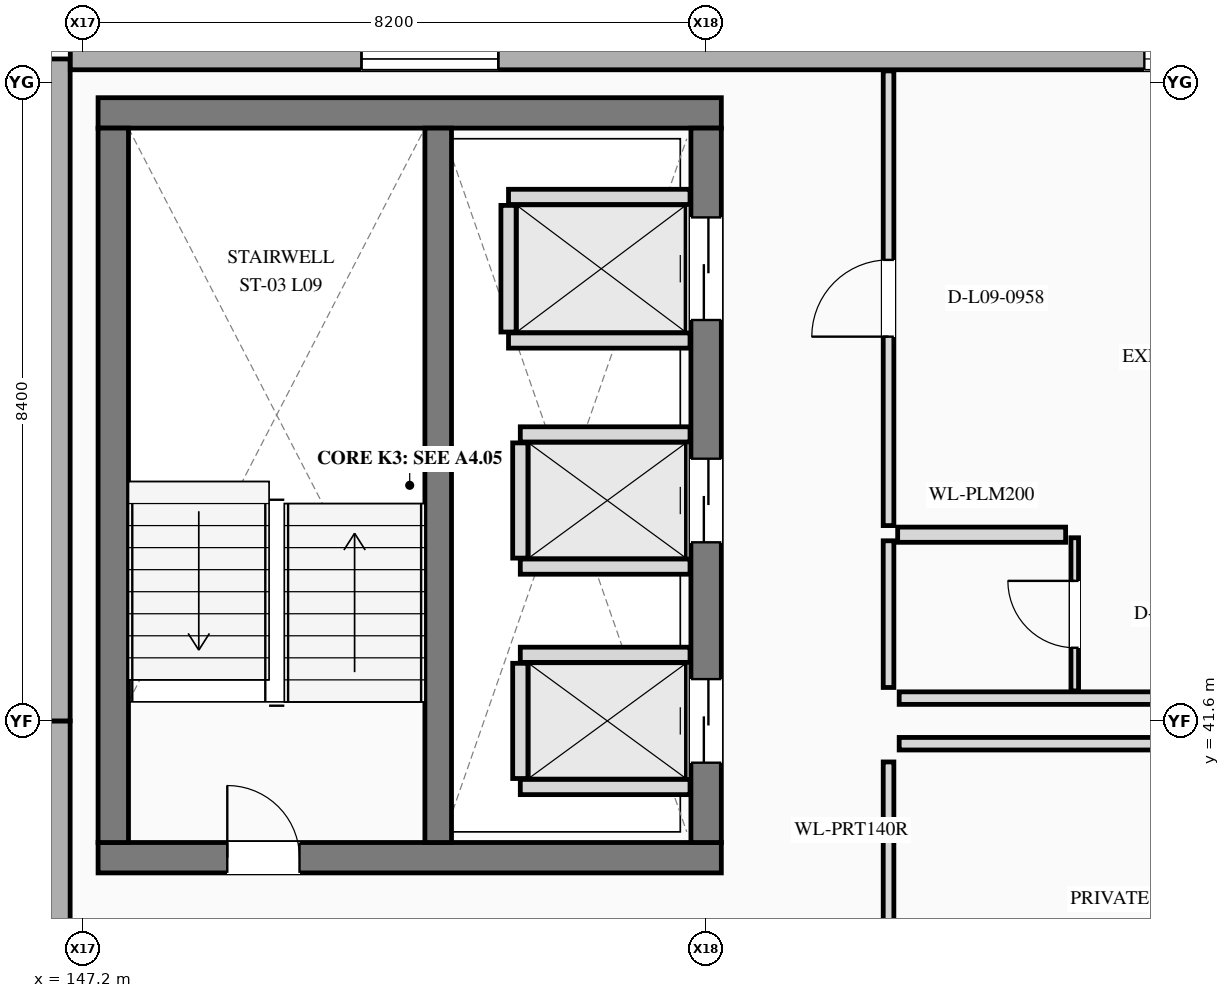
"""IFC4 building model, lengths in metres.
Left out: names, types, materials, properties, quantities, classifications, styles, units other than length and angle.
Written with IfcOpenShell. Run it as: python <this file> out.ifc"""

import sys

from ifc_helpers import new_model, si_unit, direction, frame, frame_2d, origin, place, context, subcontext, project, spatial, rectangle, extrude, element, fill, save


model = new_model("IFC4")
c1 = context("Model", 3, precision=1e-05, world=origin(), true_north=direction((0.0, 1.0)))
c2 = subcontext(c1, "Body", "Model", "MODEL_VIEW")
j1 = project(units=[si_unit("LENGTHUNIT", "METRE"), si_unit("PLANEANGLEUNIT", "RADIAN")], contexts=[c1])
p1 = place(None, origin())
s1 = spatial("IfcSite", under=j1, at=p1, CompositionType="ELEMENT")
p2 = place(p1, origin())
s2 = spatial("IfcBuilding", under=s1, at=p2, CompositionType="ELEMENT")
p3 = place(p2, frame((0.0, 0.0, 37.6)))
s3 = spatial("IfcBuildingStorey", under=s2, at=p3, CompositionType="ELEMENT", Elevation=37.6)
p4 = place(p3, frame((146.89, 33.2, 0.0), z_axis=(0.0, 0.0, 1.0), x_axis=(0.0, 1.0, 0.0)))
e1 = element("IfcWall", 1, at=p4, inside=s3, PredefinedType="STANDARD", context=c2, shape_type="SweptSolid", body=[
    extrude(rectangle(XDim=8.4, YDim=0.285, at=frame_2d((4.2, 0.0))), origin(), (0.0, 0.0, 1.0), 3.5),
])
p5 = place(p3, frame((146.89, 41.6, 0.0), z_axis=(0.0, 0.0, 1.0), x_axis=(0.0, 1.0, 0.0)))
e2 = element("IfcWall", 2, at=p5, inside=s3, PredefinedType="STANDARD", context=c2, shape_type="SweptSolid", body=[
    extrude(rectangle(XDim=8.71, YDim=0.285, at=frame_2d((4.355, 0.0))), origin(), (0.0, 0.0, 1.0), 3.5),
])
p6 = place(p3, frame((166.166, 50.31, 0.0), z_axis=(0.0, 0.0, 1.0), x_axis=(-1.0, 0.0, 0.0)))
e3 = element("IfcWall", 3, at=p6, inside=s3, PredefinedType="STANDARD", context=c2, shape_type="SweptSolid", body=[
    extrude(rectangle(XDim=19.131, YDim=0.285, at=frame_2d((9.565, 0.0))), origin(), (0.0, 0.0, 1.0), 3.5),
])
p7 = place(p6, frame((3.2, 0.0, 0.88)))
e4 = element("IfcOpeningElement", 4, at=p7, cuts=e3, PredefinedType="OPENING", context=c2, shape_type="SweptSolid", body=[
    extrude(rectangle(XDim=1.8, YDim=1.8, at=frame_2d((0.9, 0.9))), frame((0.0, 0.152, 0.0), z_axis=(0.0, -1.0, 0.0), x_axis=(1.0, 0.0, 0.0)), (0.0, 0.0, 1.0), 0.305),
])
p8 = place(p6, frame((13.5, 0.0, 0.88)))
e5 = element("IfcOpeningElement", 5, at=p8, cuts=e3, PredefinedType="OPENING", context=c2, shape_type="SweptSolid", body=[
    extrude(rectangle(XDim=1.8, YDim=1.8, at=frame_2d((0.9, 0.9))), frame((0.0, 0.152, 0.0), z_axis=(0.0, -1.0, 0.0), x_axis=(1.0, 0.0, 0.0)), (0.0, 0.0, 1.0), 0.305),
])
p9 = place(p3, frame((147.4, 39.8, 0.0), z_axis=(0.0, 0.0, 1.0), x_axis=(1.0, 0.0, 0.0)))
e6 = element("IfcWall", 6, at=p9, inside=s3, PredefinedType="SHEAR", context=c2, shape_type="SweptSolid", body=[
    extrude(rectangle(XDim=8.2, YDim=0.4, at=frame_2d((4.1, 0.0))), origin(), (0.0, 0.0, 1.0), 3.5),
])
p10 = place(p9, frame((1.7, 0.0, 0.0)))
e7 = element("IfcOpeningElement", 7, at=p10, cuts=e6, PredefinedType="OPENING", context=c2, shape_type="SweptSolid", body=[
    extrude(rectangle(XDim=0.95, YDim=2.2, at=frame_2d((0.475, 1.1))), frame((0.0, 0.21, 0.0), z_axis=(0.0, -1.0, 0.0), x_axis=(1.0, 0.0, 0.0)), (0.0, 0.0, 1.0), 0.42),
])
p11 = place(p3, frame((155.6, 49.6, 0.0), z_axis=(0.0, 0.0, 1.0), x_axis=(-1.0, 0.0, 0.0)))
e8 = element("IfcWall", 8, at=p11, inside=s3, PredefinedType="SHEAR", context=c2, shape_type="SweptSolid", body=[
    extrude(rectangle(XDim=8.2, YDim=0.4, at=frame_2d((4.1, 0.0))), origin(), (0.0, 0.0, 1.0), 3.5),
])
p12 = place(p3, frame((147.6, 49.4, 0.0), z_axis=(0.0, 0.0, 1.0), x_axis=(0.0, -1.0, 0.0)))
e9 = element("IfcWall", 9, at=p12, inside=s3, PredefinedType="SHEAR", context=c2, shape_type="SweptSolid", body=[
    extrude(rectangle(XDim=9.4, YDim=0.4, at=frame_2d((4.7, 0.0))), origin(), (0.0, 0.0, 1.0), 3.5),
])
p13 = place(p3, frame((155.4, 40.0, 0.0), z_axis=(0.0, 0.0, 1.0), x_axis=(0.0, 1.0, 0.0)))
e10 = element("IfcWall", 10, at=p13, inside=s3, PredefinedType="SHEAR", context=c2, shape_type="SweptSolid", body=[
    extrude(rectangle(XDim=9.4, YDim=0.4, at=frame_2d((4.7, 0.0))), origin(), (0.0, 0.0, 1.0), 3.5),
])
p14 = place(p13, frame((1.05, 0.0, 0.0)))
e11 = element("IfcOpeningElement", 11, at=p14, cuts=e10, PredefinedType="OPENING", context=c2, shape_type="SweptSolid", body=[
    extrude(rectangle(XDim=1.1, YDim=2.2, at=frame_2d((0.55, 1.1))), frame((0.0, 0.21, 0.0), z_axis=(0.0, -1.0, 0.0), x_axis=(1.0, 0.0, 0.0)), (0.0, 0.0, 1.0), 0.42),
])
p15 = place(p13, frame((3.95, 0.0, 0.0)))
e12 = element("IfcOpeningElement", 12, at=p15, cuts=e10, PredefinedType="OPENING", context=c2, shape_type="SweptSolid", body=[
    extrude(rectangle(XDim=1.1, YDim=2.2, at=frame_2d((0.55, 1.1))), frame((0.0, 0.21, 0.0), z_axis=(0.0, -1.0, 0.0), x_axis=(1.0, 0.0, 0.0)), (0.0, 0.0, 1.0), 0.42),
])
p16 = place(p13, frame((6.875, 0.0, 0.0)))
e13 = element("IfcOpeningElement", 13, at=p16, cuts=e10, PredefinedType="OPENING", context=c2, shape_type="SweptSolid", body=[
    extrude(rectangle(XDim=1.35, YDim=2.3, at=frame_2d((0.675, 1.15))), frame((0.0, 0.21, 0.0), z_axis=(0.0, -1.0, 0.0), x_axis=(1.0, 0.0, 0.0)), (0.0, 0.0, 1.0), 0.42),
])
p17 = place(p3, frame((151.875, 40.0, 0.0), z_axis=(0.0, 0.0, 1.0), x_axis=(0.0, 1.0, 0.0)))
e14 = element("IfcWall", 14, at=p17, inside=s3, PredefinedType="SHEAR", context=c2, shape_type="SweptSolid", body=[
    extrude(rectangle(XDim=9.4, YDim=0.35, at=frame_2d((4.7, 0.0))), origin(), (0.0, 0.0, 1.0), 3.5),
])
for number, where, z_axis, x_axis in (
    (15, (152.955, 40.73, 0.0), (0.0, 0.0, 1.0), (1.0, 0.0, 0.0)),
    (16, (152.955, 42.47, 0.0), (0.0, 0.0, 1.0), (1.0, 0.0, 0.0)),
):
    element("IfcWall", number, at=place(p3, frame(where, z_axis=z_axis, x_axis=x_axis)), inside=s3, PredefinedType="PLUMBINGWALL", context=c2, shape_type="SweptSolid", body=[
        extrude(rectangle(XDim=2.233, YDim=0.2, at=frame_2d((1.116, 0.0))), origin(), (0.0, 0.0, 1.0), 3.2),
    ])
p18 = place(p3, frame((152.955, 40.842, 0.0), z_axis=(0.0, 0.0, 1.0), x_axis=(0.0, 1.0, 0.0)))
e17 = element("IfcWall", 17, at=p18, inside=s3, PredefinedType="PLUMBINGWALL", context=c2, shape_type="SweptSolid", body=[
    extrude(rectangle(XDim=1.516, YDim=0.2, at=frame_2d((0.758, 0.0))), origin(), (0.0, 0.0, 1.0), 3.2),
])
for number, where, z_axis, x_axis in (
    (18, (152.955, 43.63, 0.0), (0.0, 0.0, 1.0), (1.0, 0.0, 0.0)),
    (19, (152.955, 45.37, 0.0), (0.0, 0.0, 1.0), (1.0, 0.0, 0.0)),
):
    element("IfcWall", number, at=place(p3, frame(where, z_axis=z_axis, x_axis=x_axis)), inside=s3, PredefinedType="PLUMBINGWALL", context=c2, shape_type="SweptSolid", body=[
        extrude(rectangle(XDim=2.233, YDim=0.2, at=frame_2d((1.116, 0.0))), origin(), (0.0, 0.0, 1.0), 3.2),
    ])
p19 = place(p3, frame((152.955, 43.742, 0.0), z_axis=(0.0, 0.0, 1.0), x_axis=(0.0, 1.0, 0.0)))
e20 = element("IfcWall", 20, at=p19, inside=s3, PredefinedType="PLUMBINGWALL", context=c2, shape_type="SweptSolid", body=[
    extrude(rectangle(XDim=1.516, YDim=0.2, at=frame_2d((0.758, 0.0))), origin(), (0.0, 0.0, 1.0), 3.2),
])
for number, where, z_axis, x_axis in (
    (21, (152.8, 46.605, 0.0), (0.0, 0.0, 1.0), (1.0, 0.0, 0.0)),
    (22, (152.8, 48.495, 0.0), (0.0, 0.0, 1.0), (1.0, 0.0, 0.0)),
):
    element("IfcWall", number, at=place(p3, frame(where, z_axis=z_axis, x_axis=x_axis)), inside=s3, PredefinedType="PLUMBINGWALL", context=c2, shape_type="SweptSolid", body=[
        extrude(rectangle(XDim=2.388, YDim=0.2, at=frame_2d((1.194, 0.0))), origin(), (0.0, 0.0, 1.0), 3.2),
    ])
p20 = place(p3, frame((152.8, 46.717, 0.0), z_axis=(0.0, 0.0, 1.0), x_axis=(0.0, 1.0, 0.0)))
e23 = element("IfcWall", 23, at=p20, inside=s3, PredefinedType="PLUMBINGWALL", context=c2, shape_type="SweptSolid", body=[
    extrude(rectangle(XDim=1.666, YDim=0.2, at=frame_2d((0.833, 0.0))), origin(), (0.0, 0.0, 1.0), 3.2),
])
p21 = place(p3, frame((157.8, 42.04, 0.0), z_axis=(0.0, 0.0, 1.0), x_axis=(0.0, 1.0, 0.0)))
e24 = element("IfcWall", 24, at=p21, inside=s3, PredefinedType="PARTITIONING", context=c2, shape_type="SweptSolid", body=[
    extrude(rectangle(XDim=1.93, YDim=0.14, at=frame_2d((0.965, 0.0))), origin(), (0.0, 0.0, 1.0), 3.2),
])
p22 = place(p3, frame((157.8, 44.17, 0.0), z_axis=(0.0, 0.0, 1.0), x_axis=(0.0, 1.0, 0.0)))
e25 = element("IfcWall", 25, at=p22, inside=s3, PredefinedType="PARTITIONING", context=c2, shape_type="SweptSolid", body=[
    extrude(rectangle(XDim=5.983, YDim=0.14, at=frame_2d((2.991, 0.0))), origin(), (0.0, 0.0, 1.0), 3.2),
])
p23 = place(p22, frame((2.486, 0.0, 0.0)))
e26 = element("IfcOpeningElement", 26, at=p23, cuts=e25, PredefinedType="OPENING", context=c2, shape_type="SweptSolid", body=[
    extrude(rectangle(XDim=1.01, YDim=2.2, at=frame_2d((0.505, 1.1))), frame((0.0, 0.08, 0.0), z_axis=(0.0, -1.0, 0.0), x_axis=(1.0, 0.0, 0.0)), (0.0, 0.0, 1.0), 0.16),
])
p24 = place(p3, frame((157.94, 41.9, 0.0), z_axis=(0.0, 0.0, 1.0), x_axis=(1.0, 0.0, 0.0)))
e27 = element("IfcWall", 27, at=p24, inside=s3, PredefinedType="PARTITIONING", context=c2, shape_type="SweptSolid", body=[
    extrude(rectangle(XDim=8.213, YDim=0.165, at=frame_2d((4.106, 0.0))), origin(), (0.0, 0.0, 1.0), 2.59),
])
p25 = place(p3, frame((157.92, 44.05, 0.0), z_axis=(0.0, 0.0, 1.0), x_axis=(1.0, 0.0, 0.0)))
e28 = element("IfcWall", 28, at=p25, inside=s3, PredefinedType="PLUMBINGWALL", context=c2, shape_type="SweptSolid", body=[
    extrude(rectangle(XDim=2.21, YDim=0.2, at=frame_2d((1.105, 0.0))), origin(), (0.0, 0.0, 1.0), 3.2),
])
p26 = place(p3, frame((160.25, 41.994, 0.0), z_axis=(0.0, 0.0, 1.0), x_axis=(0.0, 1.0, 0.0)))
e29 = element("IfcWall", 29, at=p26, inside=s3, PredefinedType="PARTITIONING", context=c2, shape_type="SweptSolid", body=[
    extrude(rectangle(XDim=2.016, YDim=0.1, at=frame_2d((1.008, 0.0))), origin(), (0.0, 0.0, 1.0), 3.2),
])
p27 = place(p26, frame((0.568, 0.0, 0.0)))
e30 = element("IfcOpeningElement", 30, at=p27, cuts=e29, PredefinedType="OPENING", context=c2, shape_type="SweptSolid", body=[
    extrude(rectangle(XDim=0.88, YDim=2.18, at=frame_2d((0.44, 1.09))), frame((0.0, 0.06, 0.0), z_axis=(0.0, -1.0, 0.0), x_axis=(1.0, 0.0, 0.0)), (0.0, 0.0, 1.0), 0.12),
])
p28 = place(p3, frame((157.8, 33.74, 0.0), z_axis=(0.0, 0.0, 1.0), x_axis=(0.0, 1.0, 0.0)))
e31 = element("IfcWall", 31, at=p28, inside=s3, PredefinedType="PARTITIONING", context=c2, shape_type="SweptSolid", body=[
    extrude(rectangle(XDim=7.32, YDim=0.14, at=frame_2d((3.66, 0.0))), origin(), (0.0, 0.0, 1.0), 2.753),
])
p29 = place(p28, frame((3.125, 0.0, 0.0)))
e32 = element("IfcOpeningElement", 32, at=p29, cuts=e31, PredefinedType="OPENING", context=c2, shape_type="SweptSolid", body=[
    extrude(rectangle(XDim=1.07, YDim=2.25, at=frame_2d((0.535, 1.125))), frame((0.0, 0.08, 0.0), z_axis=(0.0, -1.0, 0.0), x_axis=(1.0, 0.0, 0.0)), (0.0, 0.0, 1.0), 0.16),
])
p30 = place(p3, frame((157.94, 41.3, 0.0), z_axis=(0.0, 0.0, 1.0), x_axis=(1.0, 0.0, 0.0)))
e33 = element("IfcWall", 33, at=p30, inside=s3, PredefinedType="PARTITIONING", context=c2, shape_type="SweptSolid", body=[
    extrude(rectangle(XDim=8.213, YDim=0.165, at=frame_2d((4.106, 0.0))), origin(), (0.0, 0.0, 1.0), 2.59),
])
p31 = place(p7, origin())
e34 = element("IfcWindow", 34, at=p31, inside=s3, PartitioningType="SINGLE_PANEL", PredefinedType="WINDOW", context=c2, shape_type="SweptSolid", body=[
    extrude(rectangle(XDim=1.8, YDim=1.8, at=frame_2d((0.9, 0.9))), frame((0.0, 0.03, 0.0), z_axis=(0.0, -1.0, 0.0), x_axis=(1.0, 0.0, 0.0)), (0.0, 0.0, 1.0), 0.06),
])
fill(e4, e34)
p32 = place(p8, origin())
e35 = element("IfcWindow", 35, at=p32, inside=s3, PartitioningType="SINGLE_PANEL", PredefinedType="WINDOW", context=c2, shape_type="SweptSolid", body=[
    extrude(rectangle(XDim=1.8, YDim=1.8, at=frame_2d((0.9, 0.9))), frame((0.0, 0.03, 0.0), z_axis=(0.0, -1.0, 0.0), x_axis=(1.0, 0.0, 0.0)), (0.0, 0.0, 1.0), 0.06),
])
fill(e5, e35)
p33 = place(p10, origin())
e36 = element("IfcDoor", 36, at=p33, inside=s3, OperationType="SINGLE_SWING_LEFT", PredefinedType="DOOR", context=c2, shape_type="SweptSolid", body=[
    extrude(rectangle(XDim=0.95, YDim=2.2, at=frame_2d((0.475, 1.1))), frame((0.0, 0.025, 0.0), z_axis=(0.0, -1.0, 0.0), x_axis=(1.0, 0.0, 0.0)), (0.0, 0.0, 1.0), 0.05),
])
fill(e7, e36)
p34 = place(p14, origin())
e37 = element("IfcDoor", 37, at=p34, inside=s3, OperationType="SLIDING_TO_LEFT", PredefinedType="DOOR", context=c2, shape_type="SweptSolid", body=[
    extrude(rectangle(XDim=1.1, YDim=2.2, at=frame_2d((0.55, 1.1))), frame((0.0, 0.025, 0.0), z_axis=(0.0, -1.0, 0.0), x_axis=(1.0, 0.0, 0.0)), (0.0, 0.0, 1.0), 0.05),
])
fill(e11, e37)
p35 = place(p15, origin())
e38 = element("IfcDoor", 38, at=p35, inside=s3, OperationType="SLIDING_TO_RIGHT", PredefinedType="DOOR", context=c2, shape_type="SweptSolid", body=[
    extrude(rectangle(XDim=1.1, YDim=2.2, at=frame_2d((0.55, 1.1))), frame((0.0, 0.025, 0.0), z_axis=(0.0, -1.0, 0.0), x_axis=(1.0, 0.0, 0.0)), (0.0, 0.0, 1.0), 0.05),
])
fill(e12, e38)
p36 = place(p16, origin())
e39 = element("IfcDoor", 39, at=p36, inside=s3, OperationType="SLIDING_TO_LEFT", PredefinedType="DOOR", context=c2, shape_type="SweptSolid", body=[
    extrude(rectangle(XDim=1.35, YDim=2.3, at=frame_2d((0.675, 1.15))), frame((0.0, 0.025, 0.0), z_axis=(0.0, -1.0, 0.0), x_axis=(1.0, 0.0, 0.0)), (0.0, 0.0, 1.0), 0.05),
])
fill(e13, e39)
p37 = place(p23, origin())
e40 = element("IfcDoor", 40, at=p37, inside=s3, OperationType="SINGLE_SWING_LEFT", PredefinedType="DOOR", context=c2, shape_type="SweptSolid", body=[
    extrude(rectangle(XDim=1.01, YDim=2.2, at=frame_2d((0.505, 1.1))), frame((0.0, 0.025, 0.0), z_axis=(0.0, -1.0, 0.0), x_axis=(1.0, 0.0, 0.0)), (0.0, 0.0, 1.0), 0.05),
])
fill(e26, e40)
p38 = place(p27, origin())
e41 = element("IfcDoor", 41, at=p38, inside=s3, OperationType="SINGLE_SWING_RIGHT", PredefinedType="DOOR", context=c2, shape_type="SweptSolid", body=[
    extrude(rectangle(XDim=0.88, YDim=2.18, at=frame_2d((0.44, 1.09))), frame((0.0, 0.025, 0.0), z_axis=(0.0, -1.0, 0.0), x_axis=(1.0, 0.0, 0.0)), (0.0, 0.0, 1.0), 0.05),
])
fill(e30, e41)
save(model, sys.argv[1])
